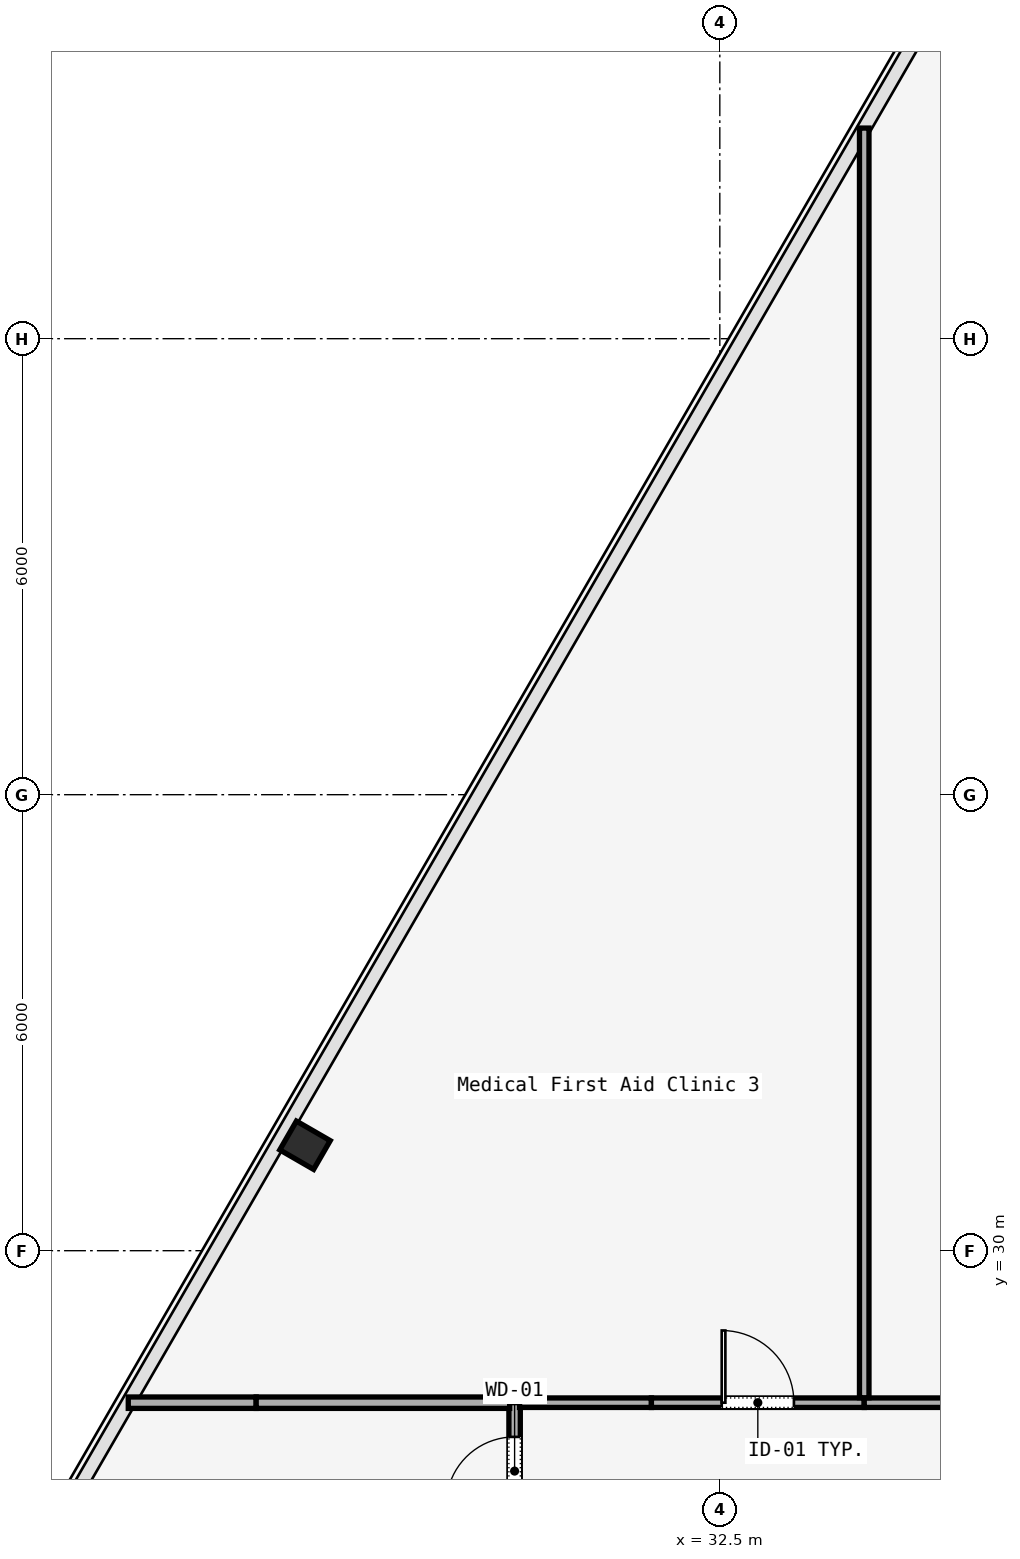
"""IFC4 building model, lengths in metres.
Left out: names, types, materials, properties, quantities, classifications, styles, units other than length and angle.
Written with IfcOpenShell. Run it as: python <this file> out.ifc"""

import sys

from ifc_helpers import new_model, si_unit, direction, frame, frame_2d, origin, origin_2d, place, context, subcontext, project, spatial, rectangle, i_section, extrude, element, fill, save


model = new_model("IFC4")
c1 = context("Model", 3, precision=1e-05, world=origin(), true_north=direction((0.0, 1.0)))
c2 = subcontext(c1, "Body", "Model", "MODEL_VIEW")
j1 = project(units=[si_unit("LENGTHUNIT", "METRE"), si_unit("PLANEANGLEUNIT", "RADIAN")], contexts=[c1])
p1 = place(None, origin())
s1 = spatial("IfcSite", under=j1, at=p1, CompositionType="ELEMENT")
p2 = place(p1, origin())
s2 = spatial("IfcBuilding", under=s1, at=p2, CompositionType="ELEMENT")
p3 = place(p2, frame((0.0, 0.0, 93.0)))
s3 = spatial("IfcBuildingStorey", under=s2, at=p3, CompositionType="ELEMENT", Elevation=93.0)
p4 = place(p3, frame((27.042, 31.387, 0.0), z_axis=(0.0, 0.0, 1.0), x_axis=(0.5, 0.866025403784, 0.0)))
e1 = element("IfcColumn", 1, at=p4, inside=s3, PredefinedType="COLUMN", context=c2, shape_type="SweptSolid", body=[
    extrude(i_section(OverallWidth=0.437, OverallDepth=0.514, WebThickness=0.061, FlangeThickness=0.077, FilletRadius=0.015, at=origin_2d()), origin(), (0.0, 0.0, 1.0), 3.58),
])
p5 = place(p3, frame((29.8, 26.2, 0.0), z_axis=(0.0, 0.0, 1.0), x_axis=(0.0, 1.0, 0.0)))
e2 = element("IfcWall", 2, at=p5, inside=s3, PredefinedType="PARTITIONING", context=c2, shape_type="SweptSolid", body=[
    extrude(rectangle(XDim=1.8, YDim=0.15, at=frame_2d((0.9, 0.0))), origin(), (0.0, 0.0, 1.0), 2.95),
])
p6 = place(p5, frame((0.45, 0.0, 0.0)))
e3 = element("IfcOpeningElement", 3, at=p6, cuts=e2, PredefinedType="OPENING", context=c2, shape_type="SweptSolid", body=[
    extrude(rectangle(XDim=0.9, YDim=2.15, at=frame_2d((0.45, 1.075))), frame((0.0, 0.075, 0.0), z_axis=(0.0, -1.0, 0.0), x_axis=(1.0, 0.0, 0.0)), (0.0, 0.0, 1.0), 0.15),
])
p7 = place(p3, frame((29.865, 28.0, 0.0), z_axis=(0.0, 0.0, 1.0), x_axis=(1.0, 0.0, 0.0)))
e4 = element("IfcWall", 4, at=p7, inside=s3, PredefinedType="PARTITIONING", context=c2, shape_type="SweptSolid", body=[
    extrude(rectangle(XDim=1.735, YDim=0.125, at=frame_2d((0.868, 0.0))), origin(), (0.0, 0.0, 1.0), 2.95),
])
p8 = place(p3, frame((31.6, 28.0, 0.0), z_axis=(0.0, 0.0, 1.0), x_axis=(1.0, 0.0, 0.0)))
e5 = element("IfcWall", 5, at=p8, inside=s3, PredefinedType="PARTITIONING", context=c2, shape_type="SweptSolid", body=[
    extrude(rectangle(XDim=2.8, YDim=0.125, at=frame_2d((1.4, 0.0))), origin(), (0.0, 0.0, 1.0), 2.95),
])
p9 = place(p8, frame((0.925, 0.0, 0.0)))
e6 = element("IfcOpeningElement", 6, at=p9, cuts=e5, PredefinedType="OPENING", context=c2, shape_type="SweptSolid", body=[
    extrude(rectangle(XDim=0.95, YDim=2.2, at=frame_2d((0.475, 1.1))), frame((0.0, 0.062, 0.0), z_axis=(0.0, -1.0, 0.0), x_axis=(1.0, 0.0, 0.0)), (0.0, 0.0, 1.0), 0.125),
])
p10 = place(p3, frame((34.4, 28.0, 0.0), z_axis=(0.0, 0.0, 1.0), x_axis=(1.0, 0.0, 0.0)))
e7 = element("IfcWall", 7, at=p10, inside=s3, PredefinedType="PARTITIONING", context=c2, shape_type="SweptSolid", body=[
    extrude(rectangle(XDim=6.4, YDim=0.125, at=frame_2d((3.2, 0.0))), origin(), (0.0, 0.0, 1.0), 2.95),
])
p11 = place(p10, frame((2.725, 0.0, 0.0)))
e8 = element("IfcOpeningElement", 8, at=p11, cuts=e7, PredefinedType="OPENING", context=c2, shape_type="SweptSolid", body=[
    extrude(rectangle(XDim=0.95, YDim=2.2, at=frame_2d((0.475, 1.1))), frame((0.0, 0.062, 0.0), z_axis=(0.0, -1.0, 0.0), x_axis=(1.0, 0.0, 0.0)), (0.0, 0.0, 1.0), 0.125),
])
p12 = place(p3, frame((24.717, 28.0, 0.0), z_axis=(0.0, 0.0, 1.0), x_axis=(1.0, 0.0, 0.0)))
e9 = element("IfcWall", 9, at=p12, inside=s3, PredefinedType="PARTITIONING", context=c2, shape_type="SweptSolid", body=[
    extrude(rectangle(XDim=1.683, YDim=0.15, at=frame_2d((0.841, 0.0))), origin(), (0.0, 0.0, 1.0), 2.95),
])
p13 = place(p3, frame((26.4, 28.0, 0.0), z_axis=(0.0, 0.0, 1.0), x_axis=(1.0, 0.0, 0.0)))
e10 = element("IfcWall", 10, at=p13, inside=s3, PredefinedType="PARTITIONING", context=c2, shape_type="SweptSolid", body=[
    extrude(rectangle(XDim=3.335, YDim=0.15, at=frame_2d((1.667, 0.0))), origin(), (0.0, 0.0, 1.0), 2.95),
])
p14 = place(p3, frame((34.4, 44.771, 0.0), z_axis=(0.0, 0.0, 1.0), x_axis=(0.0, -1.0, 0.0)))
e11 = element("IfcWall", 11, at=p14, inside=s3, PredefinedType="PARTITIONING", context=c2, shape_type="SweptSolid", body=[
    extrude(rectangle(XDim=16.706, YDim=0.125, at=frame_2d((8.353, 0.0))), origin(), (0.0, 0.0, 1.0), 2.95),
])
p15 = place(p6, origin())
e12 = element("IfcDoor", 12, at=p15, inside=s3, OperationType="SINGLE_SWING_RIGHT", PredefinedType="DOOR", context=c2, shape_type="SweptSolid", body=[
    extrude(rectangle(XDim=0.9, YDim=2.15, at=frame_2d((0.45, 1.075))), frame((0.0, 0.025, 0.0), z_axis=(0.0, -1.0, 0.0), x_axis=(1.0, 0.0, 0.0)), (0.0, 0.0, 1.0), 0.05),
])
fill(e3, e12)
p16 = place(p9, origin())
e13 = element("IfcDoor", 13, at=p16, inside=s3, OperationType="SINGLE_SWING_LEFT", PredefinedType="DOOR", context=c2, shape_type="SweptSolid", body=[
    extrude(rectangle(XDim=0.95, YDim=2.2, at=frame_2d((0.475, 1.1))), frame((0.0, 0.025, 0.0), z_axis=(0.0, -1.0, 0.0), x_axis=(1.0, 0.0, 0.0)), (0.0, 0.0, 1.0), 0.05),
])
fill(e6, e13)
save(model, sys.argv[1])
